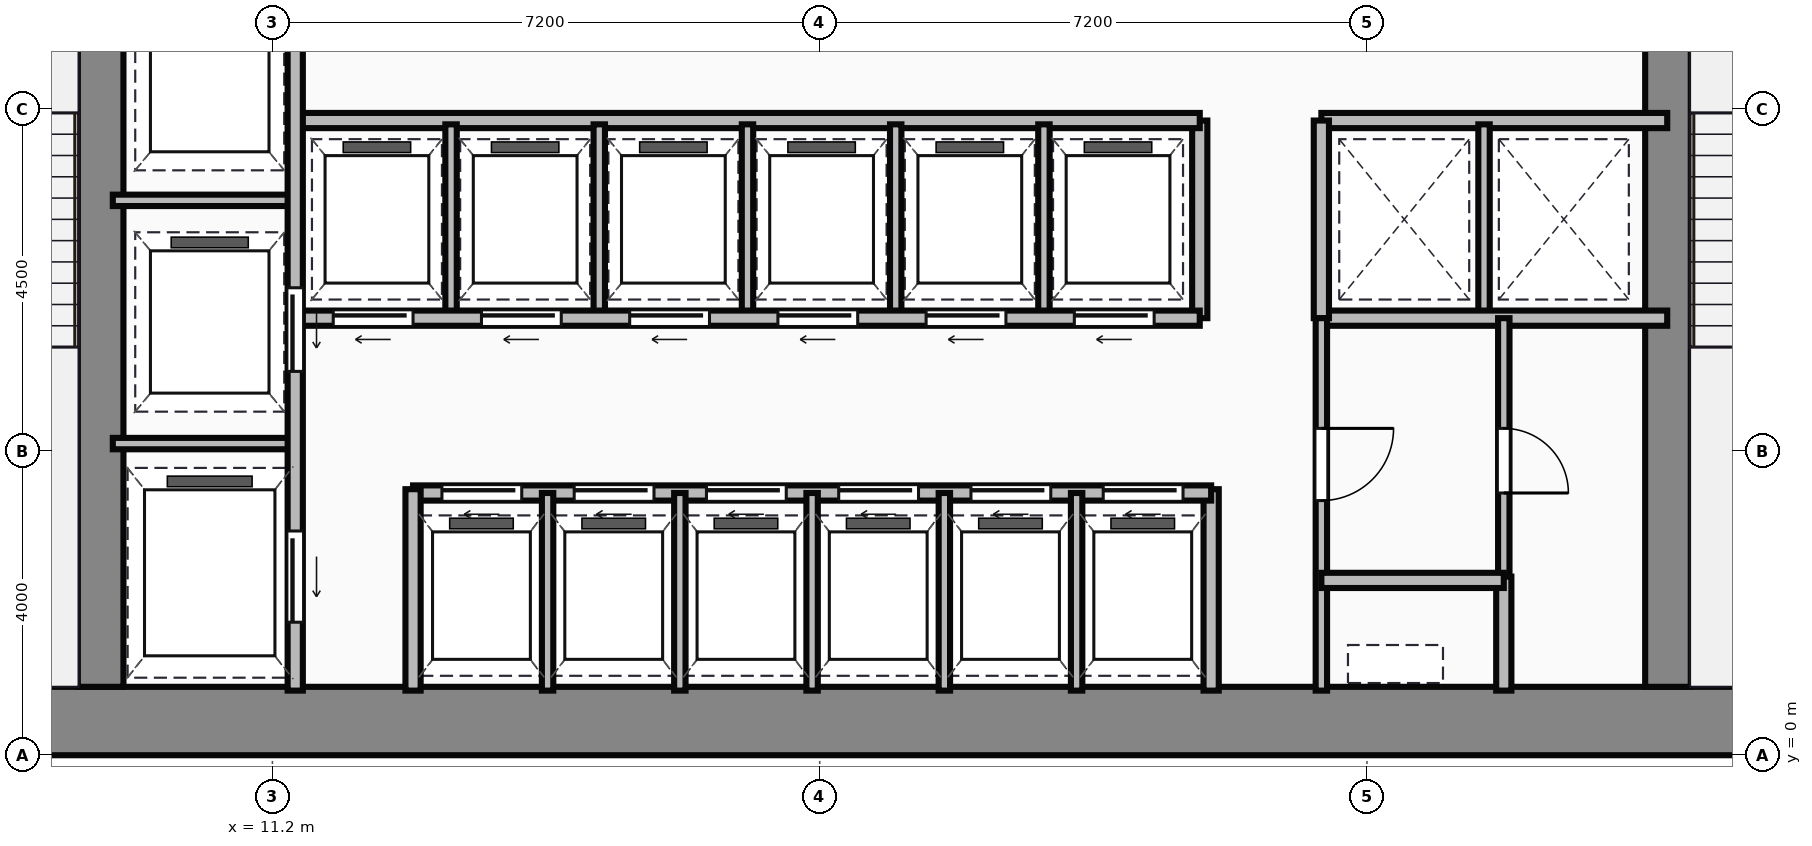
"""IFC4 building model, lengths in metres.
Left out: names, types, materials, properties, quantities, classifications, styles, units other than length and angle.
Written with IfcOpenShell. Run it as: python <this file> out.ifc"""

import sys

from ifc_helpers import new_model, si_unit, direction, frame, frame_2d, origin, place, context, subcontext, project, spatial, rectangle, extrude, source, transform, mapped, element, fill, save


model = new_model("IFC4")
c1 = context("Model", 3, precision=1e-05, world=origin(), true_north=direction((0.0, 1.0)))
c2 = subcontext(c1, "Body", "Model", "MODEL_VIEW")
j1 = project(units=[si_unit("LENGTHUNIT", "METRE"), si_unit("PLANEANGLEUNIT", "RADIAN")], contexts=[c1])
p1 = place(None, origin())
s1 = spatial("IfcSite", under=j1, at=p1, CompositionType="ELEMENT")
p2 = place(p1, origin())
s2 = spatial("IfcBuilding", under=s1, at=p2, CompositionType="ELEMENT")
p3 = place(p2, frame((0.0, 0.0, 79.95)))
s3 = spatial("IfcBuildingStorey", under=s2, at=p3, CompositionType="ELEMENT", Elevation=79.95)
m1 = source(origin(), c2, "Body", "SweptSolid", [
    extrude(rectangle(XDim=29.5, YDim=0.9, at=frame_2d((14.75, 0.0))), origin(), (0.0, 0.0, 1.0), 4.2),
])
p4 = place(p3, frame((4.5, 0.45, 0.0), z_axis=(0.0, 0.0, 1.0), x_axis=(1.0, 0.0, 0.0)))
e1 = element("IfcWall", 1, at=p4, inside=s3, PredefinedType="SHEAR", context=c2, shape_type="MappedRepresentation", body=[
    mapped(m1, transform((0.0, 0.0, 0.0))),
])
m2 = source(origin(), c2, "Body", "SweptSolid", [
    extrude(rectangle(XDim=12.2, YDim=0.6, at=frame_2d((6.1, 0.0))), origin(), (0.0, 0.0, 1.0), 4.2),
])
for number, where, z_axis, x_axis in (
    (2, (8.94, 0.9, 0.0), (0.0, 0.0, 1.0), (0.0, 1.0, 0.0)),
    (3, (29.56, 0.9, 0.0), (0.0, 0.0, 1.0), (0.0, 1.0, 0.0)),
):
    element("IfcWall", number, at=place(p3, frame(where, z_axis=z_axis, x_axis=x_axis)), inside=s3, PredefinedType="SHEAR", context=c2, shape_type="MappedRepresentation", body=[
        mapped(m2, transform((0.0, 0.0, 0.0))),
    ])
m3 = source(origin(), c2, "Body", "SweptSolid", [
    extrude(rectangle(XDim=9.6, YDim=0.2, at=frame_2d((4.8, 0.0))), origin(), (0.0, 0.0, 1.0), 3.9),
])
p5 = place(p3, frame((11.5, 0.85, 0.0), z_axis=(0.0, 0.0, 1.0), x_axis=(0.0, 1.0, 0.0)))
e4 = element("IfcWall", 4, at=p5, inside=s3, PredefinedType="PARTITIONING", context=c2, shape_type="MappedRepresentation", body=[
    mapped(m3, transform((0.0, 0.0, 0.0))),
])
p6 = place(p5, frame((4.2, 0.0, 0.0)))
e5 = element("IfcOpeningElement", 5, at=p6, cuts=e4, PredefinedType="OPENING", context=c2, shape_type="SweptSolid", body=[
    extrude(rectangle(XDim=1.1, YDim=2.15, at=frame_2d((0.55, 1.075))), frame((0.0, 0.11, 0.0), z_axis=(0.0, -1.0, 0.0), x_axis=(1.0, 0.0, 0.0)), (0.0, 0.0, 1.0), 0.22),
])
p7 = place(p5, frame((0.9, 0.0, 0.0)))
e6 = element("IfcOpeningElement", 6, at=p7, cuts=e4, PredefinedType="OPENING", context=c2, shape_type="SweptSolid", body=[
    extrude(rectangle(XDim=1.2, YDim=2.15, at=frame_2d((0.6, 1.075))), frame((0.0, 0.11, 0.0), z_axis=(0.0, -1.0, 0.0), x_axis=(1.0, 0.0, 0.0)), (0.0, 0.0, 1.0), 0.22),
])
m4 = source(origin(), c2, "Body", "SweptSolid", [
    extrude(rectangle(XDim=2.4, YDim=0.15, at=frame_2d((1.2, 0.0))), origin(), (0.0, 0.0, 1.0), 3.9),
])
for number, where, z_axis, x_axis in (
    (7, (9.1, 4.1, 0.0), (0.0, 0.0, 1.0), (1.0, 0.0, 0.0)),
    (8, (9.1, 7.3, 0.0), (0.0, 0.0, 1.0), (1.0, 0.0, 0.0)),
):
    element("IfcWall", number, at=place(p3, frame(where, z_axis=z_axis, x_axis=x_axis)), inside=s3, PredefinedType="PARTITIONING", context=c2, shape_type="MappedRepresentation", body=[
        mapped(m4, transform((0.0, 0.0, 0.0))),
    ])
m5 = source(origin(), c2, "Body", "SweptSolid", [
    extrude(rectangle(XDim=2.65, YDim=0.2, at=frame_2d((1.325, 0.0))), origin(), (0.0, 0.0, 1.0), 3.9),
])
p8 = place(p3, frame((13.05, 0.85, 0.0), z_axis=(0.0, 0.0, 1.0), x_axis=(0.0, 1.0, 0.0)))
e9 = element("IfcWall", 9, at=p8, inside=s3, PredefinedType="PARTITIONING", context=c2, shape_type="MappedRepresentation", body=[
    mapped(m5, transform((0.0, 0.0, 0.0))),
])
m6 = source(origin(), c2, "Body", "SweptSolid", [
    extrude(rectangle(XDim=10.5, YDim=0.2, at=frame_2d((5.25, 0.0))), origin(), (0.0, 0.0, 1.0), 3.9),
])
p9 = place(p3, frame((13.05, 3.45, 0.0), z_axis=(0.0, 0.0, 1.0), x_axis=(1.0, 0.0, 0.0)))
e10 = element("IfcWall", 10, at=p9, inside=s3, PredefinedType="PARTITIONING", context=c2, shape_type="MappedRepresentation", body=[
    mapped(m6, transform((0.0, 0.0, 0.0))),
])
p10 = place(p9, frame((0.38, 0.0, 0.0)))
e11 = element("IfcOpeningElement", 11, at=p10, cuts=e10, PredefinedType="OPENING", context=c2, shape_type="SweptSolid", body=[
    extrude(rectangle(XDim=1.05, YDim=2.15, at=frame_2d((0.525, 1.075))), frame((0.0, 0.11, 0.0), z_axis=(0.0, -1.0, 0.0), x_axis=(1.0, 0.0, 0.0)), (0.0, 0.0, 1.0), 0.22),
])
p11 = place(p9, frame((2.12, 0.0, 0.0)))
e12 = element("IfcOpeningElement", 12, at=p11, cuts=e10, PredefinedType="OPENING", context=c2, shape_type="SweptSolid", body=[
    extrude(rectangle(XDim=1.05, YDim=2.15, at=frame_2d((0.525, 1.075))), frame((0.0, 0.11, 0.0), z_axis=(0.0, -1.0, 0.0), x_axis=(1.0, 0.0, 0.0)), (0.0, 0.0, 1.0), 0.22),
])
p12 = place(p9, frame((3.86, 0.0, 0.0)))
e13 = element("IfcOpeningElement", 13, at=p12, cuts=e10, PredefinedType="OPENING", context=c2, shape_type="SweptSolid", body=[
    extrude(rectangle(XDim=1.05, YDim=2.15, at=frame_2d((0.525, 1.075))), frame((0.0, 0.11, 0.0), z_axis=(0.0, -1.0, 0.0), x_axis=(1.0, 0.0, 0.0)), (0.0, 0.0, 1.0), 0.22),
])
p13 = place(p9, frame((5.6, 0.0, 0.0)))
e14 = element("IfcOpeningElement", 14, at=p13, cuts=e10, PredefinedType="OPENING", context=c2, shape_type="SweptSolid", body=[
    extrude(rectangle(XDim=1.05, YDim=2.15, at=frame_2d((0.525, 1.075))), frame((0.0, 0.11, 0.0), z_axis=(0.0, -1.0, 0.0), x_axis=(1.0, 0.0, 0.0)), (0.0, 0.0, 1.0), 0.22),
])
p14 = place(p9, frame((7.34, 0.0, 0.0)))
e15 = element("IfcOpeningElement", 15, at=p14, cuts=e10, PredefinedType="OPENING", context=c2, shape_type="SweptSolid", body=[
    extrude(rectangle(XDim=1.05, YDim=2.15, at=frame_2d((0.525, 1.075))), frame((0.0, 0.11, 0.0), z_axis=(0.0, -1.0, 0.0), x_axis=(1.0, 0.0, 0.0)), (0.0, 0.0, 1.0), 0.22),
])
p15 = place(p9, frame((9.08, 0.0, 0.0)))
e16 = element("IfcOpeningElement", 16, at=p15, cuts=e10, PredefinedType="OPENING", context=c2, shape_type="SweptSolid", body=[
    extrude(rectangle(XDim=1.05, YDim=2.15, at=frame_2d((0.525, 1.075))), frame((0.0, 0.11, 0.0), z_axis=(0.0, -1.0, 0.0), x_axis=(1.0, 0.0, 0.0)), (0.0, 0.0, 1.0), 0.22),
])
p16 = place(p3, frame((23.55, 0.85, 0.0), z_axis=(0.0, 0.0, 1.0), x_axis=(0.0, 1.0, 0.0)))
e17 = element("IfcWall", 17, at=p16, inside=s3, PredefinedType="PARTITIONING", context=c2, shape_type="MappedRepresentation", body=[
    mapped(m5, transform((0.0, 0.0, 0.0))),
])
m7 = source(origin(), c2, "Body", "SweptSolid", [
    extrude(rectangle(XDim=2.6, YDim=0.15, at=frame_2d((1.3, 0.0))), origin(), (0.0, 0.0, 1.0), 3.9),
])
for number, where, z_axis, x_axis in (
    (18, (14.82, 0.85, 0.0), (0.0, 0.0, 1.0), (0.0, 1.0, 0.0)),
    (19, (16.56, 0.85, 0.0), (0.0, 0.0, 1.0), (0.0, 1.0, 0.0)),
    (20, (18.3, 0.85, 0.0), (0.0, 0.0, 1.0), (0.0, 1.0, 0.0)),
    (21, (20.04, 0.85, 0.0), (0.0, 0.0, 1.0), (0.0, 1.0, 0.0)),
    (22, (21.78, 0.85, 0.0), (0.0, 0.0, 1.0), (0.0, 1.0, 0.0)),
):
    element("IfcWall", number, at=place(p3, frame(where, z_axis=z_axis, x_axis=x_axis)), inside=s3, PredefinedType="PARTITIONING", context=c2, shape_type="MappedRepresentation", body=[
        mapped(m7, transform((0.0, 0.0, 0.0))),
    ])
m8 = source(origin(), c2, "Body", "SweptSolid", [
    extrude(rectangle(XDim=11.85, YDim=0.2, at=frame_2d((5.925, 0.0))), origin(), (0.0, 0.0, 1.0), 3.9),
])
p17 = place(p3, frame((11.55, 5.75, 0.0), z_axis=(0.0, 0.0, 1.0), x_axis=(1.0, 0.0, 0.0)))
e23 = element("IfcWall", 23, at=p17, inside=s3, PredefinedType="PARTITIONING", context=c2, shape_type="MappedRepresentation", body=[
    mapped(m8, transform((0.0, 0.0, 0.0))),
])
p18 = place(p17, frame((0.45, 0.0, 0.0)))
e24 = element("IfcOpeningElement", 24, at=p18, cuts=e23, PredefinedType="OPENING", context=c2, shape_type="SweptSolid", body=[
    extrude(rectangle(XDim=1.05, YDim=2.15, at=frame_2d((0.525, 1.075))), frame((0.0, 0.11, 0.0), z_axis=(0.0, -1.0, 0.0), x_axis=(1.0, 0.0, 0.0)), (0.0, 0.0, 1.0), 0.22),
])
p19 = place(p17, frame((2.4, 0.0, 0.0)))
e25 = element("IfcOpeningElement", 25, at=p19, cuts=e23, PredefinedType="OPENING", context=c2, shape_type="SweptSolid", body=[
    extrude(rectangle(XDim=1.05, YDim=2.15, at=frame_2d((0.525, 1.075))), frame((0.0, 0.11, 0.0), z_axis=(0.0, -1.0, 0.0), x_axis=(1.0, 0.0, 0.0)), (0.0, 0.0, 1.0), 0.22),
])
p20 = place(p17, frame((4.35, 0.0, 0.0)))
e26 = element("IfcOpeningElement", 26, at=p20, cuts=e23, PredefinedType="OPENING", context=c2, shape_type="SweptSolid", body=[
    extrude(rectangle(XDim=1.05, YDim=2.15, at=frame_2d((0.525, 1.075))), frame((0.0, 0.11, 0.0), z_axis=(0.0, -1.0, 0.0), x_axis=(1.0, 0.0, 0.0)), (0.0, 0.0, 1.0), 0.22),
])
p21 = place(p17, frame((6.3, 0.0, 0.0)))
e27 = element("IfcOpeningElement", 27, at=p21, cuts=e23, PredefinedType="OPENING", context=c2, shape_type="SweptSolid", body=[
    extrude(rectangle(XDim=1.05, YDim=2.15, at=frame_2d((0.525, 1.075))), frame((0.0, 0.11, 0.0), z_axis=(0.0, -1.0, 0.0), x_axis=(1.0, 0.0, 0.0)), (0.0, 0.0, 1.0), 0.22),
])
p22 = place(p17, frame((8.25, 0.0, 0.0)))
e28 = element("IfcOpeningElement", 28, at=p22, cuts=e23, PredefinedType="OPENING", context=c2, shape_type="SweptSolid", body=[
    extrude(rectangle(XDim=1.05, YDim=2.15, at=frame_2d((0.525, 1.075))), frame((0.0, 0.11, 0.0), z_axis=(0.0, -1.0, 0.0), x_axis=(1.0, 0.0, 0.0)), (0.0, 0.0, 1.0), 0.22),
])
p23 = place(p17, frame((10.2, 0.0, 0.0)))
e29 = element("IfcOpeningElement", 29, at=p23, cuts=e23, PredefinedType="OPENING", context=c2, shape_type="SweptSolid", body=[
    extrude(rectangle(XDim=1.05, YDim=2.15, at=frame_2d((0.525, 1.075))), frame((0.0, 0.11, 0.0), z_axis=(0.0, -1.0, 0.0), x_axis=(1.0, 0.0, 0.0)), (0.0, 0.0, 1.0), 0.22),
])
p24 = place(p3, frame((11.55, 8.35, 0.0), z_axis=(0.0, 0.0, 1.0), x_axis=(1.0, 0.0, 0.0)))
e30 = element("IfcWall", 30, at=p24, inside=s3, PredefinedType="PARTITIONING", context=c2, shape_type="MappedRepresentation", body=[
    mapped(m8, transform((0.0, 0.0, 0.0))),
])
m9 = source(origin(), c2, "Body", "SweptSolid", [
    extrude(rectangle(XDim=2.6, YDim=0.2, at=frame_2d((1.3, 0.0))), origin(), (0.0, 0.0, 1.0), 3.9),
])
p25 = place(p3, frame((23.4, 5.75, 0.0), z_axis=(0.0, 0.0, 1.0), x_axis=(0.0, 1.0, 0.0)))
e31 = element("IfcWall", 31, at=p25, inside=s3, PredefinedType="PARTITIONING", context=c2, shape_type="MappedRepresentation", body=[
    mapped(m9, transform((0.0, 0.0, 0.0))),
])
m10 = source(origin(), c2, "Body", "SweptSolid", [
    extrude(rectangle(XDim=2.5, YDim=0.15, at=frame_2d((1.25, 0.0))), origin(), (0.0, 0.0, 1.0), 3.9),
])
for number, where, z_axis, x_axis in (
    (32, (13.55, 5.8, 0.0), (0.0, 0.0, 1.0), (0.0, 1.0, 0.0)),
    (33, (15.5, 5.8, 0.0), (0.0, 0.0, 1.0), (0.0, 1.0, 0.0)),
    (34, (17.45, 5.8, 0.0), (0.0, 0.0, 1.0), (0.0, 1.0, 0.0)),
    (35, (19.4, 5.8, 0.0), (0.0, 0.0, 1.0), (0.0, 1.0, 0.0)),
    (36, (21.35, 5.8, 0.0), (0.0, 0.0, 1.0), (0.0, 1.0, 0.0)),
):
    element("IfcWall", number, at=place(p3, frame(where, z_axis=z_axis, x_axis=x_axis)), inside=s3, PredefinedType="PARTITIONING", context=c2, shape_type="MappedRepresentation", body=[
        mapped(m10, transform((0.0, 0.0, 0.0))),
    ])
m11 = source(origin(), c2, "Body", "SweptSolid", [
    extrude(rectangle(XDim=4.55, YDim=0.2, at=frame_2d((2.275, 0.0))), origin(), (0.0, 0.0, 1.0), 3.9),
])
for number, where, z_axis, x_axis in (
    (37, (25.0, 8.35, 0.0), (0.0, 0.0, 1.0), (1.0, 0.0, 0.0)),
    (38, (25.0, 5.75, 0.0), (0.0, 0.0, 1.0), (1.0, 0.0, 0.0)),
):
    element("IfcWall", number, at=place(p3, frame(where, z_axis=z_axis, x_axis=x_axis)), inside=s3, PredefinedType="PARTITIONING", context=c2, shape_type="MappedRepresentation", body=[
        mapped(m11, transform((0.0, 0.0, 0.0))),
    ])
p26 = place(p3, frame((25.0, 5.75, 0.0), z_axis=(0.0, 0.0, 1.0), x_axis=(0.0, 1.0, 0.0)))
e39 = element("IfcWall", 39, at=p26, inside=s3, PredefinedType="PARTITIONING", context=c2, shape_type="MappedRepresentation", body=[
    mapped(m9, transform((0.0, 0.0, 0.0))),
])
p27 = place(p3, frame((27.14, 5.8, 0.0), z_axis=(0.0, 0.0, 1.0), x_axis=(0.0, 1.0, 0.0)))
e40 = element("IfcWall", 40, at=p27, inside=s3, PredefinedType="PARTITIONING", context=c2, shape_type="MappedRepresentation", body=[
    mapped(m10, transform((0.0, 0.0, 0.0))),
])
m12 = source(origin(), c2, "Body", "SweptSolid", [
    extrude(rectangle(XDim=4.9, YDim=0.15, at=frame_2d((2.45, 0.0))), origin(), (0.0, 0.0, 1.0), 3.9),
])
p28 = place(p3, frame((25.0, 0.85, 0.0), z_axis=(0.0, 0.0, 1.0), x_axis=(0.0, 1.0, 0.0)))
e41 = element("IfcWall", 41, at=p28, inside=s3, PredefinedType="PARTITIONING", context=c2, shape_type="MappedRepresentation", body=[
    mapped(m12, transform((0.0, 0.0, 0.0))),
])
p29 = place(p28, frame((2.5, 0.0, 0.0)))
e42 = element("IfcOpeningElement", 42, at=p29, cuts=e41, PredefinedType="OPENING", context=c2, shape_type="SweptSolid", body=[
    extrude(rectangle(XDim=0.95, YDim=2.15, at=frame_2d((0.475, 1.075))), frame((0.0, 0.085, 0.0), z_axis=(0.0, -1.0, 0.0), x_axis=(1.0, 0.0, 0.0)), (0.0, 0.0, 1.0), 0.17),
])
m13 = source(origin(), c2, "Body", "SweptSolid", [
    extrude(rectangle(XDim=2.4, YDim=0.2, at=frame_2d((1.2, 0.0))), origin(), (0.0, 0.0, 1.0), 3.9),
])
p30 = place(p3, frame((25.0, 2.3, 0.0), z_axis=(0.0, 0.0, 1.0), x_axis=(1.0, 0.0, 0.0)))
e43 = element("IfcWall", 43, at=p30, inside=s3, PredefinedType="PARTITIONING", context=c2, shape_type="MappedRepresentation", body=[
    mapped(m13, transform((0.0, 0.0, 0.0))),
])
m14 = source(origin(), c2, "Body", "SweptSolid", [
    extrude(rectangle(XDim=1.5, YDim=0.2, at=frame_2d((0.75, 0.0))), origin(), (0.0, 0.0, 1.0), 3.9),
])
p31 = place(p3, frame((27.4, 0.85, 0.0), z_axis=(0.0, 0.0, 1.0), x_axis=(0.0, 1.0, 0.0)))
e44 = element("IfcWall", 44, at=p31, inside=s3, PredefinedType="PARTITIONING", context=c2, shape_type="MappedRepresentation", body=[
    mapped(m14, transform((0.0, 0.0, 0.0))),
])
m15 = source(origin(), c2, "Body", "SweptSolid", [
    extrude(rectangle(XDim=3.4, YDim=0.15, at=frame_2d((1.7, 0.0))), origin(), (0.0, 0.0, 1.0), 3.9),
])
p32 = place(p3, frame((27.4, 2.35, 0.0), z_axis=(0.0, 0.0, 1.0), x_axis=(0.0, 1.0, 0.0)))
e45 = element("IfcWall", 45, at=p32, inside=s3, PredefinedType="PARTITIONING", context=c2, shape_type="MappedRepresentation", body=[
    mapped(m15, transform((0.0, 0.0, 0.0))),
])
p33 = place(p32, frame((1.1, 0.0, 0.0)))
e46 = element("IfcOpeningElement", 46, at=p33, cuts=e45, PredefinedType="OPENING", context=c2, shape_type="SweptSolid", body=[
    extrude(rectangle(XDim=0.85, YDim=2.1, at=frame_2d((0.425, 1.05))), frame((0.0, 0.085, 0.0), z_axis=(0.0, -1.0, 0.0), x_axis=(1.0, 0.0, 0.0)), (0.0, 0.0, 1.0), 0.17),
])
m16 = source(origin(), c2, "Body", "SweptSolid", [
    extrude(rectangle(XDim=1.1, YDim=2.15, at=frame_2d((0.55, 1.075))), frame((0.0, 0.025, 0.0), z_axis=(0.0, -1.0, 0.0), x_axis=(1.0, 0.0, 0.0)), (0.0, 0.0, 1.0), 0.05),
])
p34 = place(p6, frame((1.1, 0.0, 0.0), z_axis=(0.0, 0.0, 1.0), x_axis=(-1.0, 0.0, 0.0)))
e47 = element("IfcDoor", 47, at=p34, inside=s3, OperationType="SLIDING_TO_LEFT", PredefinedType="DOOR", context=c2, shape_type="MappedRepresentation", body=[
    mapped(m16, transform((0.0, 0.0, 0.0))),
])
fill(e5, e47)
m17 = source(origin(), c2, "Body", "SweptSolid", [
    extrude(rectangle(XDim=1.2, YDim=2.15, at=frame_2d((0.6, 1.075))), frame((0.0, 0.025, 0.0), z_axis=(0.0, -1.0, 0.0), x_axis=(1.0, 0.0, 0.0)), (0.0, 0.0, 1.0), 0.05),
])
p35 = place(p7, frame((1.2, 0.0, 0.0), z_axis=(0.0, 0.0, 1.0), x_axis=(-1.0, 0.0, 0.0)))
e48 = element("IfcDoor", 48, at=p35, inside=s3, OperationType="SLIDING_TO_LEFT", PredefinedType="DOOR", context=c2, shape_type="MappedRepresentation", body=[
    mapped(m17, transform((0.0, 0.0, 0.0))),
])
fill(e6, e48)
m18 = source(origin(), c2, "Body", "SweptSolid", [
    extrude(rectangle(XDim=1.05, YDim=2.15, at=frame_2d((0.525, 1.075))), frame((0.0, 0.025, 0.0), z_axis=(0.0, -1.0, 0.0), x_axis=(1.0, 0.0, 0.0)), (0.0, 0.0, 1.0), 0.05),
])
p36 = place(p10, origin())
e49 = element("IfcDoor", 49, at=p36, inside=s3, OperationType="SLIDING_TO_LEFT", PredefinedType="DOOR", context=c2, shape_type="MappedRepresentation", body=[
    mapped(m18, transform((0.0, 0.0, 0.0))),
])
fill(e11, e49)
p37 = place(p11, origin())
e50 = element("IfcDoor", 50, at=p37, inside=s3, OperationType="SLIDING_TO_LEFT", PredefinedType="DOOR", context=c2, shape_type="MappedRepresentation", body=[
    mapped(m18, transform((0.0, 0.0, 0.0))),
])
fill(e12, e50)
p38 = place(p12, origin())
e51 = element("IfcDoor", 51, at=p38, inside=s3, OperationType="SLIDING_TO_LEFT", PredefinedType="DOOR", context=c2, shape_type="MappedRepresentation", body=[
    mapped(m18, transform((0.0, 0.0, 0.0))),
])
fill(e13, e51)
p39 = place(p13, origin())
e52 = element("IfcDoor", 52, at=p39, inside=s3, OperationType="SLIDING_TO_LEFT", PredefinedType="DOOR", context=c2, shape_type="MappedRepresentation", body=[
    mapped(m18, transform((0.0, 0.0, 0.0))),
])
fill(e14, e52)
p40 = place(p14, origin())
e53 = element("IfcDoor", 53, at=p40, inside=s3, OperationType="SLIDING_TO_LEFT", PredefinedType="DOOR", context=c2, shape_type="MappedRepresentation", body=[
    mapped(m18, transform((0.0, 0.0, 0.0))),
])
fill(e15, e53)
p41 = place(p15, origin())
e54 = element("IfcDoor", 54, at=p41, inside=s3, OperationType="SLIDING_TO_LEFT", PredefinedType="DOOR", context=c2, shape_type="MappedRepresentation", body=[
    mapped(m18, transform((0.0, 0.0, 0.0))),
])
fill(e16, e54)
p42 = place(p18, frame((1.05, 0.0, 0.0), z_axis=(0.0, 0.0, 1.0), x_axis=(-1.0, 0.0, 0.0)))
e55 = element("IfcDoor", 55, at=p42, inside=s3, OperationType="SLIDING_TO_LEFT", PredefinedType="DOOR", context=c2, shape_type="MappedRepresentation", body=[
    mapped(m18, transform((0.0, 0.0, 0.0))),
])
fill(e24, e55)
p43 = place(p19, frame((1.05, 0.0, 0.0), z_axis=(0.0, 0.0, 1.0), x_axis=(-1.0, 0.0, 0.0)))
e56 = element("IfcDoor", 56, at=p43, inside=s3, OperationType="SLIDING_TO_LEFT", PredefinedType="DOOR", context=c2, shape_type="MappedRepresentation", body=[
    mapped(m18, transform((0.0, 0.0, 0.0))),
])
fill(e25, e56)
p44 = place(p20, frame((1.05, 0.0, 0.0), z_axis=(0.0, 0.0, 1.0), x_axis=(-1.0, 0.0, 0.0)))
e57 = element("IfcDoor", 57, at=p44, inside=s3, OperationType="SLIDING_TO_LEFT", PredefinedType="DOOR", context=c2, shape_type="MappedRepresentation", body=[
    mapped(m18, transform((0.0, 0.0, 0.0))),
])
fill(e26, e57)
p45 = place(p21, frame((1.05, 0.0, 0.0), z_axis=(0.0, 0.0, 1.0), x_axis=(-1.0, 0.0, 0.0)))
e58 = element("IfcDoor", 58, at=p45, inside=s3, OperationType="SLIDING_TO_LEFT", PredefinedType="DOOR", context=c2, shape_type="MappedRepresentation", body=[
    mapped(m18, transform((0.0, 0.0, 0.0))),
])
fill(e27, e58)
p46 = place(p22, frame((1.05, 0.0, 0.0), z_axis=(0.0, 0.0, 1.0), x_axis=(-1.0, 0.0, 0.0)))
e59 = element("IfcDoor", 59, at=p46, inside=s3, OperationType="SLIDING_TO_LEFT", PredefinedType="DOOR", context=c2, shape_type="MappedRepresentation", body=[
    mapped(m18, transform((0.0, 0.0, 0.0))),
])
fill(e28, e59)
p47 = place(p23, frame((1.05, 0.0, 0.0), z_axis=(0.0, 0.0, 1.0), x_axis=(-1.0, 0.0, 0.0)))
e60 = element("IfcDoor", 60, at=p47, inside=s3, OperationType="SLIDING_TO_LEFT", PredefinedType="DOOR", context=c2, shape_type="MappedRepresentation", body=[
    mapped(m18, transform((0.0, 0.0, 0.0))),
])
fill(e29, e60)
m19 = source(origin(), c2, "Body", "SweptSolid", [
    extrude(rectangle(XDim=0.95, YDim=2.15, at=frame_2d((0.475, 1.075))), frame((0.0, 0.025, 0.0), z_axis=(0.0, -1.0, 0.0), x_axis=(1.0, 0.0, 0.0)), (0.0, 0.0, 1.0), 0.05),
])
p48 = place(p29, origin())
e61 = element("IfcDoor", 61, at=p48, inside=s3, OperationType="SINGLE_SWING_RIGHT", PredefinedType="DOOR", context=c2, shape_type="MappedRepresentation", body=[
    mapped(m19, transform((0.0, 0.0, 0.0))),
])
fill(e42, e61)
m20 = source(origin(), c2, "Body", "SweptSolid", [
    extrude(rectangle(XDim=0.85, YDim=2.1, at=frame_2d((0.425, 1.05))), frame((0.0, 0.025, 0.0), z_axis=(0.0, -1.0, 0.0), x_axis=(1.0, 0.0, 0.0)), (0.0, 0.0, 1.0), 0.05),
])
p49 = place(p33, frame((0.85, 0.0, 0.0), z_axis=(0.0, 0.0, 1.0), x_axis=(-1.0, 0.0, 0.0)))
e62 = element("IfcDoor", 62, at=p49, inside=s3, OperationType="SINGLE_SWING_LEFT", PredefinedType="DOOR", context=c2, shape_type="MappedRepresentation", body=[
    mapped(m20, transform((0.0, 0.0, 0.0))),
])
fill(e46, e62)
save(model, sys.argv[1])
